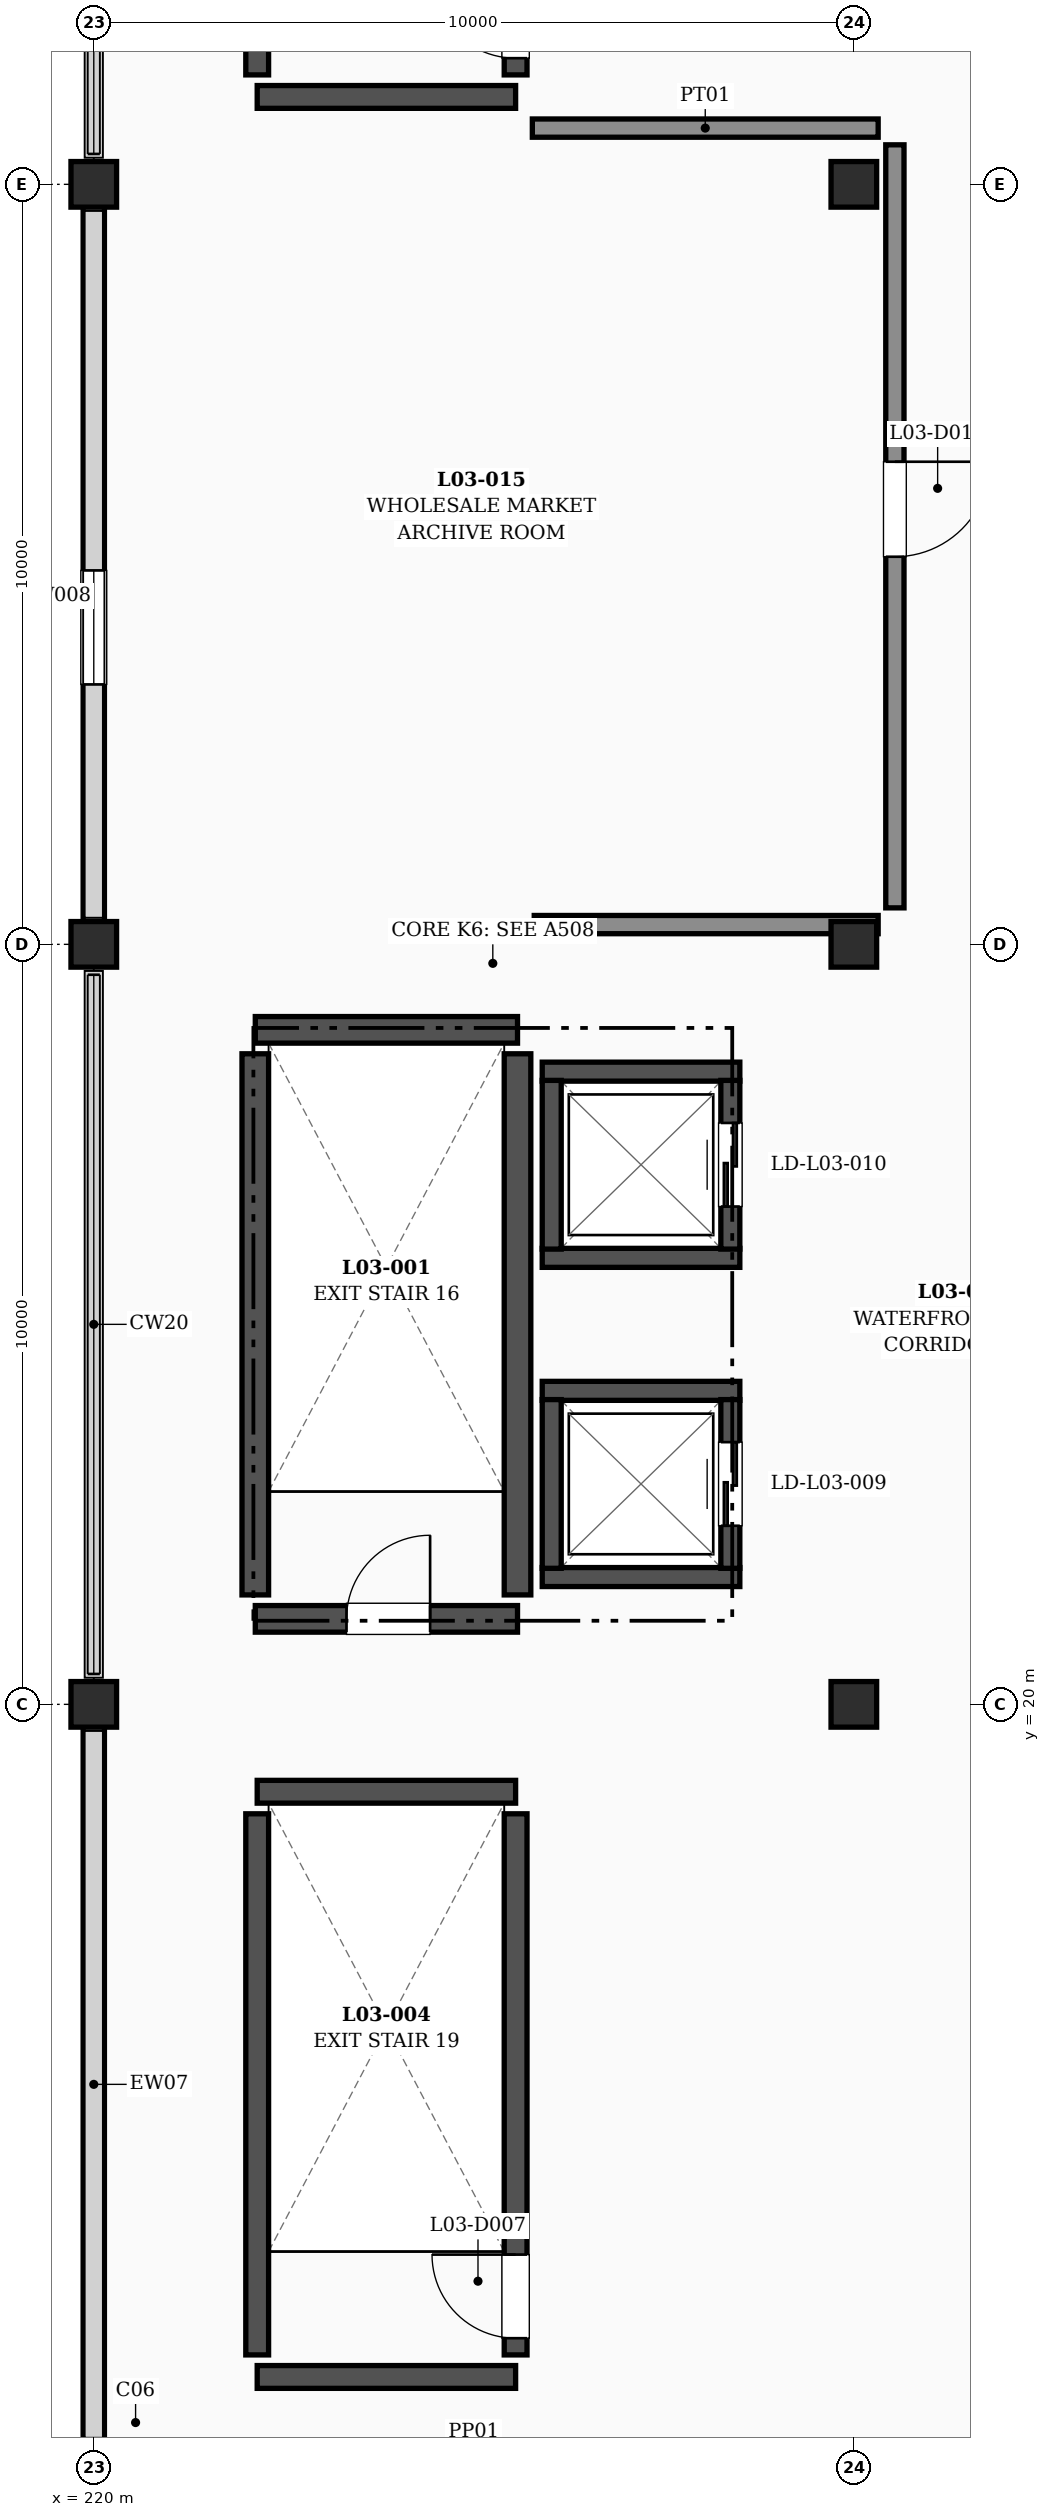
"""IFC4 building model, lengths in metres.
Left out: names, types, materials, properties, quantities, classifications, styles, units other than length and angle.
Written with IfcOpenShell. Run it as: python <this file> out.ifc"""

import sys

from ifc_helpers import new_model, si_unit, direction, frame, frame_2d, origin, origin_2d, place, context, subcontext, project, spatial, rectangle, extrude, element, fill, save


model = new_model("IFC4")
c1 = context("Model", 3, precision=1e-05, world=origin(), true_north=direction((0.0, 1.0)))
c2 = subcontext(c1, "Body", "Model", "MODEL_VIEW")
j1 = project(units=[si_unit("LENGTHUNIT", "METRE"), si_unit("PLANEANGLEUNIT", "RADIAN")], contexts=[c1])
p1 = place(None, origin())
s1 = spatial("IfcSite", under=j1, at=p1, CompositionType="ELEMENT")
p2 = place(p1, origin())
s2 = spatial("IfcBuilding", under=s1, at=p2, CompositionType="ELEMENT")
p3 = place(p2, frame((0.0, 0.0, 15.0)))
s3 = spatial("IfcBuildingStorey", under=s2, at=p3, CompositionType="ELEMENT", Elevation=15.0)
for number, where, z_axis, x_axis in (
    (1, (220.0, 20.0, 0.0), (0.0, 0.0, 1.0), (1.0, 0.0, 0.0)),
    (2, (220.0, 30.0, 0.0), (0.0, 0.0, 1.0), (1.0, 0.0, 0.0)),
    (3, (220.0, 40.0, 0.0), (0.0, 0.0, 1.0), (1.0, 0.0, 0.0)),
    (4, (230.0, 20.0, 0.0), (0.0, 0.0, 1.0), (1.0, 0.0, 0.0)),
    (5, (230.0, 30.0, 0.0), (0.0, 0.0, 1.0), (1.0, 0.0, 0.0)),
    (6, (230.0, 40.0, 0.0), (0.0, 0.0, 1.0), (1.0, 0.0, 0.0)),
):
    element("IfcColumn", number, at=place(p3, frame(where, z_axis=z_axis, x_axis=x_axis)), inside=s3, PredefinedType="COLUMN", context=c2, shape_type="SweptSolid", body=[
        extrude(rectangle(XDim=0.6, YDim=0.6, at=origin_2d()), origin(), (0.0, 0.0, 1.0), 4.2),
    ])
p4 = place(p3, frame((220.0, 10.22, 0.0), z_axis=(0.0, 0.0, 1.0), x_axis=(0.0, 1.0, 0.0)))
e7 = element("IfcWall", 7, at=p4, inside=s3, PredefinedType="SOLIDWALL", context=c2, shape_type="SweptSolid", body=[
    extrude(rectangle(XDim=9.56, YDim=0.28, at=frame_2d((4.78, 0.0))), origin(), (0.0, 0.0, 1.0), 3.28),
])
p5 = place(p3, frame((220.0, 30.22, 0.0), z_axis=(0.0, 0.0, 1.0), x_axis=(0.0, 1.0, 0.0)))
e8 = element("IfcWall", 8, at=p5, inside=s3, PredefinedType="SOLIDWALL", context=c2, shape_type="SweptSolid", body=[
    extrude(rectangle(XDim=9.56, YDim=0.28, at=frame_2d((4.78, 0.0))), origin(), (0.0, 0.0, 1.0), 3.28),
])
p6 = place(p5, frame((3.2, 0.0, 0.95)))
e9 = element("IfcOpeningElement", 9, at=p6, cuts=e8, PredefinedType="OPENING", context=c2, shape_type="SweptSolid", body=[
    extrude(rectangle(XDim=1.5, YDim=1.1, at=frame_2d((0.75, 0.55))), frame((0.0, 0.15, 0.0), z_axis=(0.0, -1.0, 0.0), x_axis=(1.0, 0.0, 0.0)), (0.0, 0.0, 1.0), 0.3),
])
for number, where, z_axis, x_axis in (
    (10, (220.0, 10.35, 4.2), (0.0, 0.0, 1.0), (0.0, 1.0, 0.0)),
    (11, (220.0, 20.35, 4.2), (0.0, 0.0, 1.0), (0.0, 1.0, 0.0)),
    (12, (220.0, 30.35, 4.2), (0.0, 0.0, 1.0), (0.0, 1.0, 0.0)),
    (13, (220.0, 40.35, 4.2), (0.0, 0.0, 1.0), (0.0, 1.0, 0.0)),
):
    element("IfcWall", number, at=place(p3, frame(where, z_axis=z_axis, x_axis=x_axis)), inside=s3, PredefinedType="PARAPET", context=c2, shape_type="SweptSolid", body=[
        extrude(rectangle(XDim=9.3, YDim=0.24, at=frame_2d((4.65, 0.0))), origin(), (0.0, 0.0, 1.0), 1.15),
    ])
p7 = place(p3, frame((222.125, 21.125, 0.0), z_axis=(0.0, 0.0, 1.0), x_axis=(1.0, 0.0, 0.0)))
e14 = element("IfcWall", 14, at=p7, inside=s3, PredefinedType="SHEAR", context=c2, shape_type="SweptSolid", body=[
    extrude(rectangle(XDim=3.45, YDim=0.35, at=frame_2d((1.725, 0.0))), origin(), (0.0, 0.0, 1.0), 4.0),
])
p8 = place(p7, frame((1.2, 0.0, 0.0)))
e15 = element("IfcOpeningElement", 15, at=p8, cuts=e14, PredefinedType="OPENING", context=c2, shape_type="SweptSolid", body=[
    extrude(rectangle(XDim=1.1, YDim=2.2, at=frame_2d((0.55, 1.1))), frame((0.0, 0.185, 0.0), z_axis=(0.0, -1.0, 0.0), x_axis=(1.0, 0.0, 0.0)), (0.0, 0.0, 1.0), 0.37),
])
p9 = place(p3, frame((222.125, 28.875, 0.0), z_axis=(0.0, 0.0, 1.0), x_axis=(1.0, 0.0, 0.0)))
e16 = element("IfcWall", 16, at=p9, inside=s3, PredefinedType="SHEAR", context=c2, shape_type="SweptSolid", body=[
    extrude(rectangle(XDim=3.45, YDim=0.35, at=frame_2d((1.725, 0.0))), origin(), (0.0, 0.0, 1.0), 4.0),
])
for number, where, z_axis, x_axis in (
    (17, (222.125, 21.44, 0.0), (0.0, 0.0, 1.0), (0.0, 1.0, 0.0)),
    (18, (225.575, 21.44, 0.0), (0.0, 0.0, 1.0), (0.0, 1.0, 0.0)),
):
    element("IfcWall", number, at=place(p3, frame(where, z_axis=z_axis, x_axis=x_axis)), inside=s3, PredefinedType="SHEAR", context=c2, shape_type="SweptSolid", body=[
        extrude(rectangle(XDim=7.12, YDim=0.35, at=frame_2d((3.56, 0.0))), origin(), (0.0, 0.0, 1.0), 4.0),
    ])
p10 = place(p3, frame((222.15, 41.15, 0.0), z_axis=(0.0, 0.0, 1.0), x_axis=(1.0, 0.0, 0.0)))
e19 = element("IfcWall", 19, at=p10, inside=s3, PredefinedType="SHEAR", context=c2, shape_type="SweptSolid", body=[
    extrude(rectangle(XDim=3.4, YDim=0.3, at=frame_2d((1.7, 0.0))), origin(), (0.0, 0.0, 1.0), 4.0),
])
p11 = place(p3, frame((222.15, 41.44, 0.0), z_axis=(0.0, 0.0, 1.0), x_axis=(0.0, 1.0, 0.0)))
e20 = element("IfcWall", 20, at=p11, inside=s3, PredefinedType="SHEAR", context=c2, shape_type="SweptSolid", body=[
    extrude(rectangle(XDim=7.12, YDim=0.3, at=frame_2d((3.56, 0.0))), origin(), (0.0, 0.0, 1.0), 4.0),
])
p12 = place(p3, frame((225.55, 41.44, 0.0), z_axis=(0.0, 0.0, 1.0), x_axis=(0.0, 1.0, 0.0)))
e21 = element("IfcWall", 21, at=p12, inside=s3, PredefinedType="SHEAR", context=c2, shape_type="SweptSolid", body=[
    extrude(rectangle(XDim=7.12, YDim=0.3, at=frame_2d((3.56, 0.0))), origin(), (0.0, 0.0, 1.0), 4.0),
])
p13 = place(p12, frame((0.22, 0.0, 0.0)))
e22 = element("IfcOpeningElement", 22, at=p13, cuts=e21, PredefinedType="OPENING", context=c2, shape_type="SweptSolid", body=[
    extrude(rectangle(XDim=1.1, YDim=2.2, at=frame_2d((0.55, 1.1))), frame((0.0, 0.16, 0.0), z_axis=(0.0, -1.0, 0.0), x_axis=(1.0, 0.0, 0.0)), (0.0, 0.0, 1.0), 0.32),
])
for number, where, z_axis, x_axis in (
    (23, (222.15, 11.15, 0.0), (0.0, 0.0, 1.0), (1.0, 0.0, 0.0)),
    (24, (222.15, 18.85, 0.0), (0.0, 0.0, 1.0), (1.0, 0.0, 0.0)),
):
    element("IfcWall", number, at=place(p3, frame(where, z_axis=z_axis, x_axis=x_axis)), inside=s3, PredefinedType="SHEAR", context=c2, shape_type="SweptSolid", body=[
        extrude(rectangle(XDim=3.4, YDim=0.3, at=frame_2d((1.7, 0.0))), origin(), (0.0, 0.0, 1.0), 4.0),
    ])
p14 = place(p3, frame((222.15, 11.44, 0.0), z_axis=(0.0, 0.0, 1.0), x_axis=(0.0, 1.0, 0.0)))
e25 = element("IfcWall", 25, at=p14, inside=s3, PredefinedType="SHEAR", context=c2, shape_type="SweptSolid", body=[
    extrude(rectangle(XDim=7.12, YDim=0.3, at=frame_2d((3.56, 0.0))), origin(), (0.0, 0.0, 1.0), 4.0),
])
p15 = place(p3, frame((225.55, 11.44, 0.0), z_axis=(0.0, 0.0, 1.0), x_axis=(0.0, 1.0, 0.0)))
e26 = element("IfcWall", 26, at=p15, inside=s3, PredefinedType="SHEAR", context=c2, shape_type="SweptSolid", body=[
    extrude(rectangle(XDim=7.12, YDim=0.3, at=frame_2d((3.56, 0.0))), origin(), (0.0, 0.0, 1.0), 4.0),
])
p16 = place(p15, frame((0.22, 0.0, 0.0)))
e27 = element("IfcOpeningElement", 27, at=p16, cuts=e26, PredefinedType="OPENING", context=c2, shape_type="SweptSolid", body=[
    extrude(rectangle(XDim=1.1, YDim=2.2, at=frame_2d((0.55, 1.1))), frame((0.0, 0.16, 0.0), z_axis=(0.0, -1.0, 0.0), x_axis=(1.0, 0.0, 0.0)), (0.0, 0.0, 1.0), 0.32),
])
for number, where, z_axis, x_axis in (
    (28, (225.9, 21.675, 0.0), (0.0, 0.0, 1.0), (1.0, 0.0, 0.0)),
    (29, (225.9, 24.125, 0.0), (0.0, 0.0, 1.0), (1.0, 0.0, 0.0)),
):
    element("IfcWall", number, at=place(p3, frame(where, z_axis=z_axis, x_axis=x_axis)), inside=s3, PredefinedType="SHEAR", context=c2, shape_type="SweptSolid", body=[
        extrude(rectangle(XDim=2.6, YDim=0.25, at=frame_2d((1.3, 0.0))), origin(), (0.0, 0.0, 1.0), 4.0),
    ])
p17 = place(p3, frame((226.025, 21.79, 0.0), z_axis=(0.0, 0.0, 1.0), x_axis=(0.0, 1.0, 0.0)))
e30 = element("IfcWall", 30, at=p17, inside=s3, PredefinedType="SHEAR", context=c2, shape_type="SweptSolid", body=[
    extrude(rectangle(XDim=2.22, YDim=0.25, at=frame_2d((1.11, 0.0))), origin(), (0.0, 0.0, 1.0), 4.0),
])
p18 = place(p3, frame((228.375, 21.79, 0.0), z_axis=(0.0, 0.0, 1.0), x_axis=(0.0, 1.0, 0.0)))
e31 = element("IfcWall", 31, at=p18, inside=s3, PredefinedType="SHEAR", context=c2, shape_type="SweptSolid", body=[
    extrude(rectangle(XDim=2.22, YDim=0.25, at=frame_2d((1.11, 0.0))), origin(), (0.0, 0.0, 1.0), 4.0),
])
p19 = place(p18, frame((0.56, 0.0, 0.0)))
e32 = element("IfcOpeningElement", 32, at=p19, cuts=e31, PredefinedType="OPENING", context=c2, shape_type="SweptSolid", body=[
    extrude(rectangle(XDim=1.1, YDim=2.2, at=frame_2d((0.55, 1.1))), frame((0.0, 0.135, 0.0), z_axis=(0.0, -1.0, 0.0), x_axis=(1.0, 0.0, 0.0)), (0.0, 0.0, 1.0), 0.27),
])
for number, where, z_axis, x_axis in (
    (33, (225.9, 25.875, 0.0), (0.0, 0.0, 1.0), (1.0, 0.0, 0.0)),
    (34, (225.9, 28.325, 0.0), (0.0, 0.0, 1.0), (1.0, 0.0, 0.0)),
):
    element("IfcWall", number, at=place(p3, frame(where, z_axis=z_axis, x_axis=x_axis)), inside=s3, PredefinedType="SHEAR", context=c2, shape_type="SweptSolid", body=[
        extrude(rectangle(XDim=2.6, YDim=0.25, at=frame_2d((1.3, 0.0))), origin(), (0.0, 0.0, 1.0), 4.0),
    ])
p20 = place(p3, frame((226.025, 25.99, 0.0), z_axis=(0.0, 0.0, 1.0), x_axis=(0.0, 1.0, 0.0)))
e35 = element("IfcWall", 35, at=p20, inside=s3, PredefinedType="SHEAR", context=c2, shape_type="SweptSolid", body=[
    extrude(rectangle(XDim=2.22, YDim=0.25, at=frame_2d((1.11, 0.0))), origin(), (0.0, 0.0, 1.0), 4.0),
])
p21 = place(p3, frame((228.375, 25.99, 0.0), z_axis=(0.0, 0.0, 1.0), x_axis=(0.0, 1.0, 0.0)))
e36 = element("IfcWall", 36, at=p21, inside=s3, PredefinedType="SHEAR", context=c2, shape_type="SweptSolid", body=[
    extrude(rectangle(XDim=2.22, YDim=0.25, at=frame_2d((1.11, 0.0))), origin(), (0.0, 0.0, 1.0), 4.0),
])
p22 = place(p21, frame((0.56, 0.0, 0.0)))
e37 = element("IfcOpeningElement", 37, at=p22, cuts=e36, PredefinedType="OPENING", context=c2, shape_type="SweptSolid", body=[
    extrude(rectangle(XDim=1.1, YDim=2.2, at=frame_2d((0.55, 1.1))), frame((0.0, 0.135, 0.0), z_axis=(0.0, -1.0, 0.0), x_axis=(1.0, 0.0, 0.0)), (0.0, 0.0, 1.0), 0.27),
])
p23 = place(p3, frame((225.77, 40.74, 0.0), z_axis=(0.0, 0.0, 1.0), x_axis=(1.0, 0.0, 0.0)))
e38 = element("IfcWall", 38, at=p23, inside=s3, PredefinedType="PARTITIONING", context=c2, shape_type="SweptSolid", body=[
    extrude(rectangle(XDim=4.55, YDim=0.24, at=frame_2d((2.275, 0.0))), origin(), (0.0, 0.0, 1.0), 3.28),
])
p24 = place(p3, frame((230.54, 40.52, 0.0), z_axis=(0.0, 0.0, 1.0), x_axis=(0.0, -1.0, 0.0)))
e39 = element("IfcWall", 39, at=p24, inside=s3, PredefinedType="PARTITIONING", context=c2, shape_type="SweptSolid", body=[
    extrude(rectangle(XDim=10.04, YDim=0.24, at=frame_2d((5.02, 0.0))), origin(), (0.0, 0.0, 1.0), 3.28),
])
p25 = place(p24, frame((4.17, 0.0, 0.0)))
e40 = element("IfcOpeningElement", 40, at=p25, cuts=e39, PredefinedType="OPENING", context=c2, shape_type="SweptSolid", body=[
    extrude(rectangle(XDim=1.25, YDim=2.2, at=frame_2d((0.625, 1.1))), frame((0.0, 0.13, 0.0), z_axis=(0.0, -1.0, 0.0), x_axis=(1.0, 0.0, 0.0)), (0.0, 0.0, 1.0), 0.26),
])
p26 = place(p3, frame((230.32, 30.26, 0.0), z_axis=(0.0, 0.0, 1.0), x_axis=(-1.0, 0.0, 0.0)))
e41 = element("IfcWall", 41, at=p26, inside=s3, PredefinedType="PARTITIONING", context=c2, shape_type="SweptSolid", body=[
    extrude(rectangle(XDim=4.525, YDim=0.24, at=frame_2d((2.263, 0.0))), origin(), (0.0, 0.0, 1.0), 3.28),
])
p27 = place(p6, origin())
e42 = element("IfcWindow", 42, at=p27, inside=s3, PartitioningType="SINGLE_PANEL", PredefinedType="WINDOW", context=c2, shape_type="SweptSolid", body=[
    extrude(rectangle(XDim=1.5, YDim=1.1, at=frame_2d((0.75, 0.55))), frame((0.0, 0.03, 0.0), z_axis=(0.0, -1.0, 0.0), x_axis=(1.0, 0.0, 0.0)), (0.0, 0.0, 1.0), 0.06),
])
fill(e9, e42)
p28 = place(p8, origin())
e43 = element("IfcDoor", 43, at=p28, inside=s3, OperationType="SINGLE_SWING_RIGHT", PredefinedType="DOOR", context=c2, shape_type="SweptSolid", body=[
    extrude(rectangle(XDim=1.1, YDim=2.2, at=frame_2d((0.55, 1.1))), frame((0.0, 0.025, 0.0), z_axis=(0.0, -1.0, 0.0), x_axis=(1.0, 0.0, 0.0)), (0.0, 0.0, 1.0), 0.05),
])
fill(e15, e43)
p29 = place(p13, origin())
e44 = element("IfcDoor", 44, at=p29, inside=s3, OperationType="SINGLE_SWING_RIGHT", PredefinedType="DOOR", context=c2, shape_type="SweptSolid", body=[
    extrude(rectangle(XDim=1.1, YDim=2.2, at=frame_2d((0.55, 1.1))), frame((0.0, 0.025, 0.0), z_axis=(0.0, -1.0, 0.0), x_axis=(1.0, 0.0, 0.0)), (0.0, 0.0, 1.0), 0.05),
])
fill(e22, e44)
p30 = place(p16, origin())
e45 = element("IfcDoor", 45, at=p30, inside=s3, OperationType="SINGLE_SWING_RIGHT", PredefinedType="DOOR", context=c2, shape_type="SweptSolid", body=[
    extrude(rectangle(XDim=1.1, YDim=2.2, at=frame_2d((0.55, 1.1))), frame((0.0, 0.025, 0.0), z_axis=(0.0, -1.0, 0.0), x_axis=(1.0, 0.0, 0.0)), (0.0, 0.0, 1.0), 0.05),
])
fill(e27, e45)
p31 = place(p19, origin())
e46 = element("IfcDoor", 46, at=p31, inside=s3, OperationType="DOUBLE_DOOR_SLIDING", PredefinedType="DOOR", context=c2, shape_type="SweptSolid", body=[
    extrude(rectangle(XDim=1.1, YDim=2.2, at=frame_2d((0.55, 1.1))), frame((0.0, 0.025, 0.0), z_axis=(0.0, -1.0, 0.0), x_axis=(1.0, 0.0, 0.0)), (0.0, 0.0, 1.0), 0.05),
])
fill(e32, e46)
p32 = place(p22, origin())
e47 = element("IfcDoor", 47, at=p32, inside=s3, OperationType="DOUBLE_DOOR_SLIDING", PredefinedType="DOOR", context=c2, shape_type="SweptSolid", body=[
    extrude(rectangle(XDim=1.1, YDim=2.2, at=frame_2d((0.55, 1.1))), frame((0.0, 0.025, 0.0), z_axis=(0.0, -1.0, 0.0), x_axis=(1.0, 0.0, 0.0)), (0.0, 0.0, 1.0), 0.05),
])
fill(e37, e47)
p33 = place(p25, origin())
e48 = element("IfcDoor", 48, at=p33, inside=s3, OperationType="SINGLE_SWING_LEFT", PredefinedType="DOOR", context=c2, shape_type="SweptSolid", body=[
    extrude(rectangle(XDim=1.25, YDim=2.2, at=frame_2d((0.625, 1.1))), frame((0.0, 0.025, 0.0), z_axis=(0.0, -1.0, 0.0), x_axis=(1.0, 0.0, 0.0)), (0.0, 0.0, 1.0), 0.05),
])
fill(e40, e48)
save(model, sys.argv[1])
